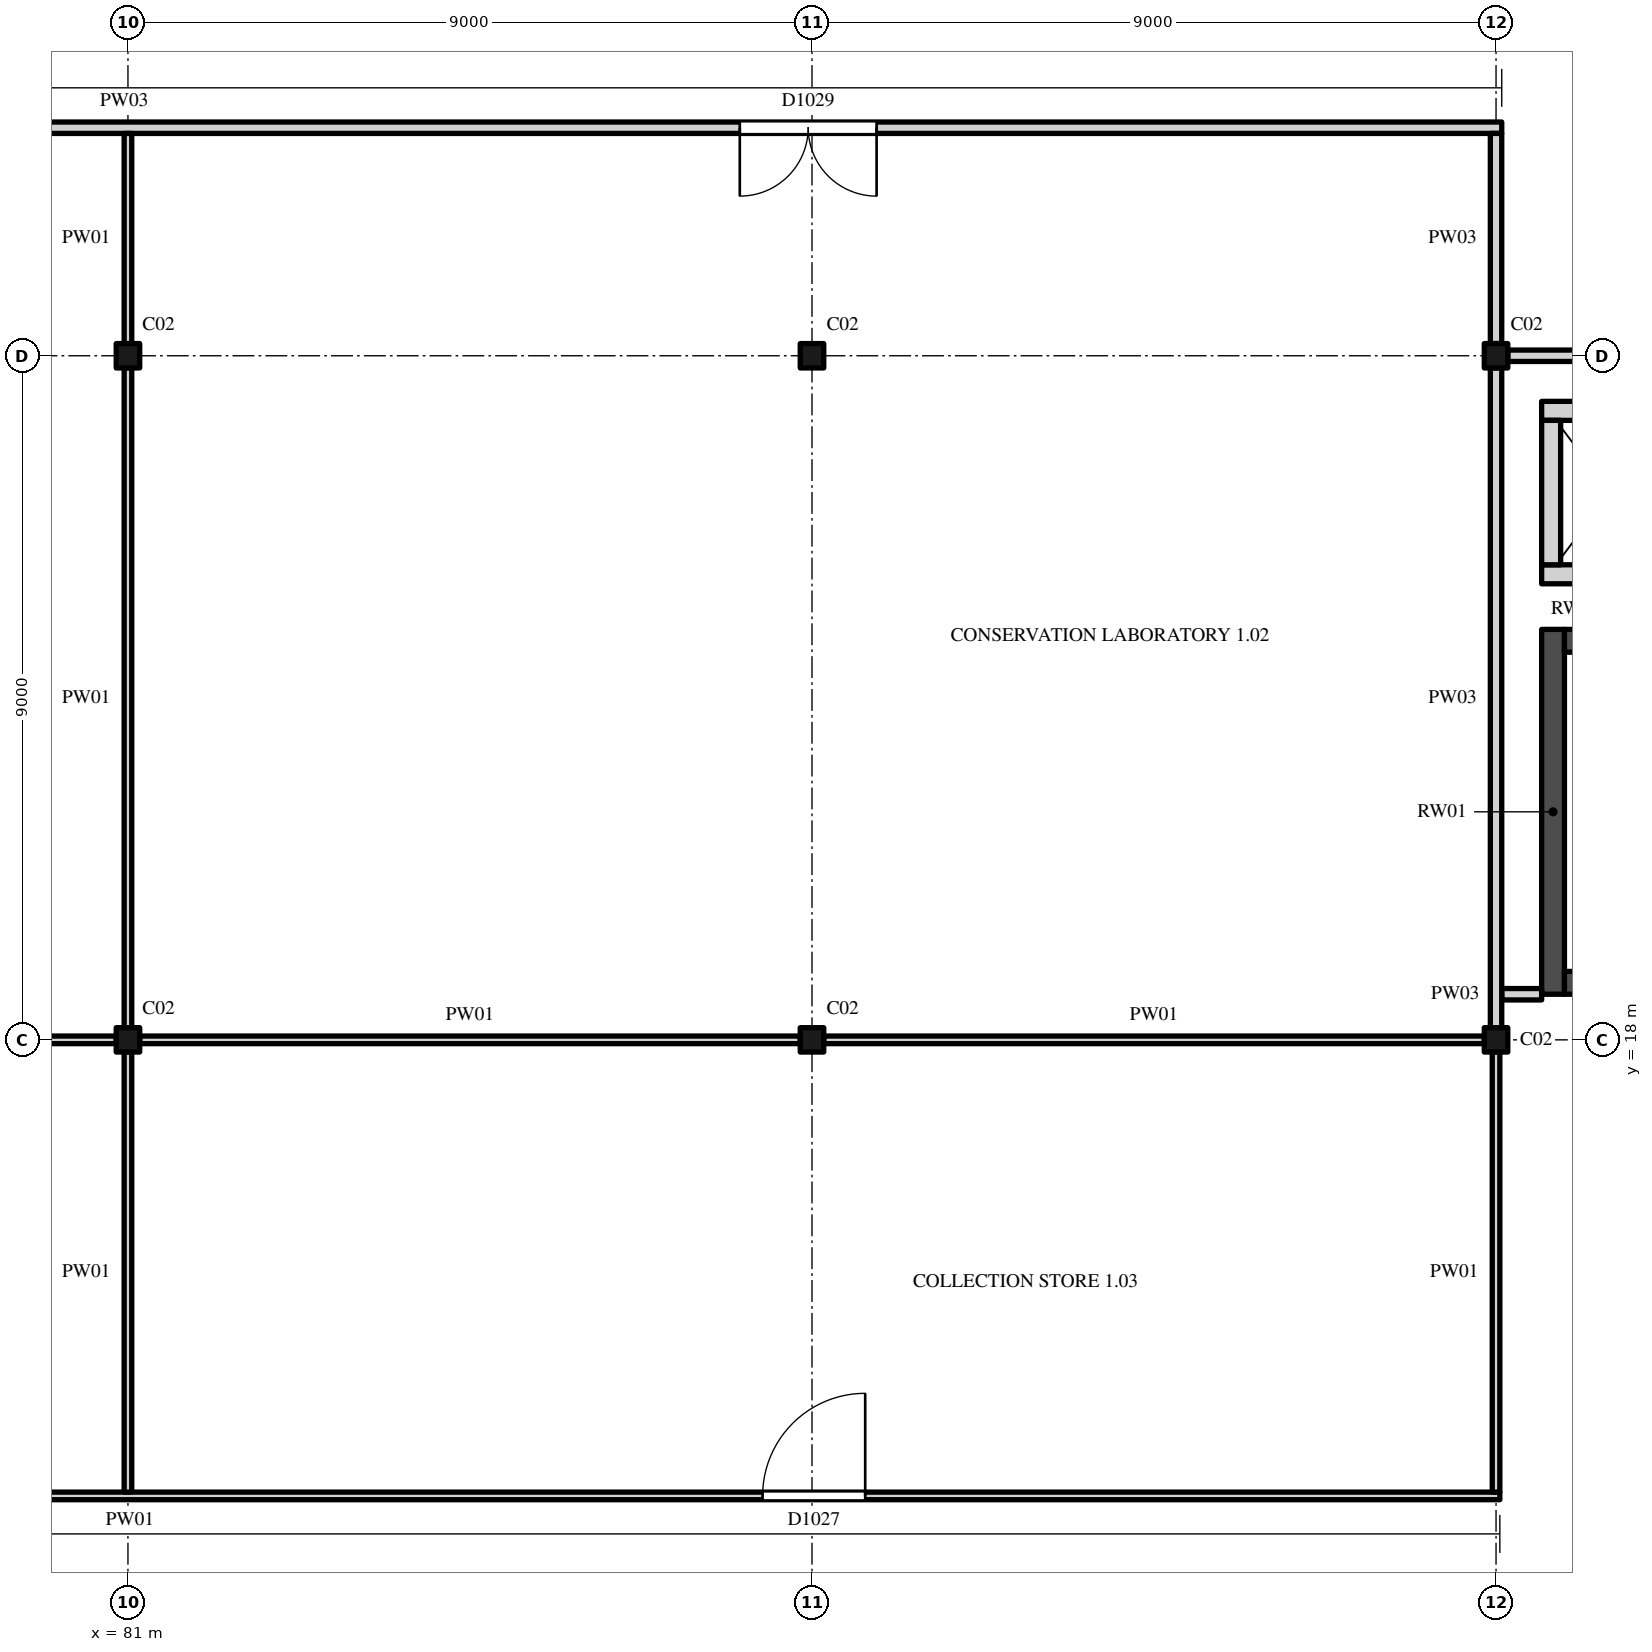
"""IFC4 building model, lengths in metres.
Left out: names, types, materials, properties, quantities, classifications, styles, units other than length and angle.
Written with IfcOpenShell. Run it as: python <this file> out.ifc"""

import sys

from ifc_helpers import new_model, si_unit, direction, frame, frame_2d, origin, origin_2d, place, context, subcontext, project, spatial, rectangle, i_section, extrude, element, fill, save


model = new_model("IFC4")
c1 = context("Model", 3, precision=1e-05, world=origin(), true_north=direction((0.0, 1.0)))
c2 = subcontext(c1, "Body", "Model", "MODEL_VIEW")
j1 = project(units=[si_unit("LENGTHUNIT", "METRE"), si_unit("PLANEANGLEUNIT", "RADIAN")], contexts=[c1])
p1 = place(None, origin())
s1 = spatial("IfcSite", under=j1, at=p1, CompositionType="ELEMENT")
p2 = place(p1, origin())
s2 = spatial("IfcBuilding", under=s1, at=p2, CompositionType="ELEMENT")
p3 = place(p2, frame((0.0, 0.0, 6.0)))
s3 = spatial("IfcBuildingStorey", under=s2, at=p3, CompositionType="ELEMENT", Elevation=6.0)
for number, where, z_axis, x_axis in (
    (1, (81.0, 18.0, 0.0), (0.0, 0.0, 1.0), (1.0, 0.0, 0.0)),
    (2, (90.0, 18.0, 0.0), (0.0, 0.0, 1.0), (1.0, 0.0, 0.0)),
    (3, (99.0, 18.0, 0.0), (0.0, 0.0, 1.0), (1.0, 0.0, 0.0)),
    (4, (81.0, 27.0, 0.0), (0.0, 0.0, 1.0), (1.0, 0.0, 0.0)),
    (5, (90.0, 27.0, 0.0), (0.0, 0.0, 1.0), (1.0, 0.0, 0.0)),
    (6, (99.0, 27.0, 0.0), (0.0, 0.0, 1.0), (1.0, 0.0, 0.0)),
):
    element("IfcColumn", number, at=place(p3, frame(where, z_axis=z_axis, x_axis=x_axis)), inside=s3, PredefinedType="COLUMN", context=c2, shape_type="SweptSolid", body=[
        extrude(i_section(OverallWidth=0.309, OverallDepth=0.321, WebThickness=0.014, FlangeThickness=0.022, FilletRadius=0.017, at=origin_2d()), origin(), (0.0, 0.0, 1.0), 5.0),
    ])
p4 = place(p3, frame((99.75, 18.6, 0.0), z_axis=(0.0, 0.0, 1.0), x_axis=(0.0, 1.0, 0.0)))
e7 = element("IfcWall", 7, at=p4, inside=s3, PredefinedType="SHEAR", context=c2, shape_type="SweptSolid", body=[
    extrude(rectangle(XDim=4.8, YDim=0.3, at=frame_2d((2.4, 0.0))), origin(), (0.0, 0.0, 1.0), 5.0),
])
p5 = place(p3, frame((99.9, 18.75, 0.0), z_axis=(0.0, 0.0, 1.0), x_axis=(1.0, 0.0, 0.0)))
e8 = element("IfcWall", 8, at=p5, inside=s3, PredefinedType="SHEAR", context=c2, shape_type="SweptSolid", body=[
    extrude(rectangle(XDim=3.45, YDim=0.3, at=frame_2d((1.725, 0.0))), origin(), (0.0, 0.0, 1.0), 5.0),
])
p6 = place(p5, frame((0.6, 0.0, 0.0)))
e9 = element("IfcOpeningElement", 9, at=p6, cuts=e8, PredefinedType="OPENING", context=c2, shape_type="SweptSolid", body=[
    extrude(rectangle(XDim=2.1, YDim=2.4, at=frame_2d((1.05, 1.2))), frame((0.0, 0.16, 0.0), z_axis=(0.0, -1.0, 0.0), x_axis=(1.0, 0.0, 0.0)), (0.0, 0.0, 1.0), 0.32),
])
p7 = place(p3, frame((99.9, 23.25, 0.0), z_axis=(0.0, 0.0, 1.0), x_axis=(1.0, 0.0, 0.0)))
e10 = element("IfcWall", 10, at=p7, inside=s3, PredefinedType="SHEAR", context=c2, shape_type="SweptSolid", body=[
    extrude(rectangle(XDim=3.45, YDim=0.3, at=frame_2d((1.725, 0.0))), origin(), (0.0, 0.0, 1.0), 5.0),
])
for number, where, z_axis, x_axis in (
    (11, (99.6, 24.125, 0.0), (0.0, 0.0, 1.0), (1.0, 0.0, 0.0)),
    (12, (99.6, 26.275, 0.0), (0.0, 0.0, 1.0), (1.0, 0.0, 0.0)),
):
    element("IfcWall", number, at=place(p3, frame(where, z_axis=z_axis, x_axis=x_axis)), inside=s3, PredefinedType="STANDARD", context=c2, shape_type="SweptSolid", body=[
        extrude(rectangle(XDim=1.8, YDim=0.25, at=frame_2d((0.9, 0.0))), origin(), (0.0, 0.0, 1.0), 5.0),
    ])
p8 = place(p3, frame((99.725, 24.25, 0.0), z_axis=(0.0, 0.0, 1.0), x_axis=(0.0, 1.0, 0.0)))
e13 = element("IfcWall", 13, at=p8, inside=s3, PredefinedType="STANDARD", context=c2, shape_type="SweptSolid", body=[
    extrude(rectangle(XDim=1.9, YDim=0.25, at=frame_2d((0.95, 0.0))), origin(), (0.0, 0.0, 1.0), 5.0),
])
p9 = place(p3, frame((63.1, 12.0, 0.0), z_axis=(0.0, 0.0, 1.0), x_axis=(1.0, 0.0, 0.0)))
e14 = element("IfcWall", 14, at=p9, inside=s3, PredefinedType="PARTITIONING", context=c2, shape_type="SweptSolid", body=[
    extrude(rectangle(XDim=35.95, YDim=0.1, at=frame_2d((17.975, 0.0))), origin(), (0.0, 0.0, 1.0), 4.419),
])
p10 = place(p9, frame((8.25, 0.0, 0.0)))
e15 = element("IfcOpeningElement", 15, at=p10, cuts=e14, PredefinedType="OPENING", context=c2, shape_type="SweptSolid", body=[
    extrude(rectangle(XDim=1.35, YDim=2.4, at=frame_2d((0.675, 1.2))), frame((0.0, 0.06, 0.0), z_axis=(0.0, -1.0, 0.0), x_axis=(1.0, 0.0, 0.0)), (0.0, 0.0, 1.0), 0.12),
])
p11 = place(p9, frame((26.25, 0.0, 0.0)))
e16 = element("IfcOpeningElement", 16, at=p11, cuts=e14, PredefinedType="OPENING", context=c2, shape_type="SweptSolid", body=[
    extrude(rectangle(XDim=1.35, YDim=2.4, at=frame_2d((0.675, 1.2))), frame((0.0, 0.06, 0.0), z_axis=(0.0, -1.0, 0.0), x_axis=(1.0, 0.0, 0.0)), (0.0, 0.0, 1.0), 0.12),
])
for number, where, z_axis, x_axis in (
    (17, (72.155, 18.0, 0.0), (0.0, 0.0, 1.0), (1.0, 0.0, 0.0)),
    (18, (81.155, 18.0, 0.0), (0.0, 0.0, 1.0), (1.0, 0.0, 0.0)),
    (19, (90.155, 18.0, 0.0), (0.0, 0.0, 1.0), (1.0, 0.0, 0.0)),
):
    element("IfcWall", number, at=place(p3, frame(where, z_axis=z_axis, x_axis=x_axis)), inside=s3, PredefinedType="PARTITIONING", context=c2, shape_type="SweptSolid", body=[
        extrude(rectangle(XDim=8.691, YDim=0.1, at=frame_2d((4.345, 0.0))), origin(), (0.0, 0.0, 1.0), 4.419),
    ])
p12 = place(p3, frame((99.075, 18.6, 0.0), z_axis=(0.0, 0.0, 1.0), x_axis=(1.0, 0.0, 0.0)))
e20 = element("IfcWall", 20, at=p12, inside=s3, PredefinedType="PARTITIONING", context=c2, shape_type="SweptSolid", body=[
    extrude(rectangle(XDim=0.525, YDim=0.15, at=frame_2d((0.263, 0.0))), origin(), (0.0, 0.0, 1.0), 4.825),
])
p13 = place(p3, frame((99.155, 27.0, 0.0), z_axis=(0.0, 0.0, 1.0), x_axis=(1.0, 0.0, 0.0)))
e21 = element("IfcWall", 21, at=p13, inside=s3, PredefinedType="PARTITIONING", context=c2, shape_type="SweptSolid", body=[
    extrude(rectangle(XDim=8.691, YDim=0.15, at=frame_2d((4.345, 0.0))), origin(), (0.0, 0.0, 1.0), 4.419),
])
p14 = place(p13, frame((3.75, 0.0, 0.0)))
e22 = element("IfcOpeningElement", 22, at=p14, cuts=e21, PredefinedType="OPENING", context=c2, shape_type="SweptSolid", body=[
    extrude(rectangle(XDim=1.2, YDim=2.4, at=frame_2d((0.6, 1.2))), frame((0.0, 0.085, 0.0), z_axis=(0.0, -1.0, 0.0), x_axis=(1.0, 0.0, 0.0)), (0.0, 0.0, 1.0), 0.17),
])
p15 = place(p3, frame((62.4, 30.0, 0.0), z_axis=(0.0, 0.0, 1.0), x_axis=(1.0, 0.0, 0.0)))
e23 = element("IfcWall", 23, at=p15, inside=s3, PredefinedType="PARTITIONING", context=c2, shape_type="SweptSolid", body=[
    extrude(rectangle(XDim=36.675, YDim=0.15, at=frame_2d((18.337, 0.0))), origin(), (0.0, 0.0, 1.0), 4.419),
])
p16 = place(p15, frame((8.65, 0.0, 0.0)))
e24 = element("IfcOpeningElement", 24, at=p16, cuts=e23, PredefinedType="OPENING", context=c2, shape_type="SweptSolid", body=[
    extrude(rectangle(XDim=1.8, YDim=2.1, at=frame_2d((0.9, 1.05))), frame((0.0, 0.085, 0.0), z_axis=(0.0, -1.0, 0.0), x_axis=(1.0, 0.0, 0.0)), (0.0, 0.0, 1.0), 0.17),
])
p17 = place(p15, frame((26.65, 0.0, 0.0)))
e25 = element("IfcOpeningElement", 25, at=p17, cuts=e23, PredefinedType="OPENING", context=c2, shape_type="SweptSolid", body=[
    extrude(rectangle(XDim=1.8, YDim=2.1, at=frame_2d((0.9, 1.05))), frame((0.0, 0.085, 0.0), z_axis=(0.0, -1.0, 0.0), x_axis=(1.0, 0.0, 0.0)), (0.0, 0.0, 1.0), 0.17),
])
p18 = place(p3, frame((81.0, 12.05, 0.0), z_axis=(0.0, 0.0, 1.0), x_axis=(0.0, 1.0, 0.0)))
e26 = element("IfcWall", 26, at=p18, inside=s3, PredefinedType="PARTITIONING", context=c2, shape_type="SweptSolid", body=[
    extrude(rectangle(XDim=5.79, YDim=0.1, at=frame_2d((2.895, 0.0))), origin(), (0.0, 0.0, 1.0), 4.297),
])
p19 = place(p3, frame((81.0, 18.16, 0.0), z_axis=(0.0, 0.0, 1.0), x_axis=(0.0, 1.0, 0.0)))
e27 = element("IfcWall", 27, at=p19, inside=s3, PredefinedType="PARTITIONING", context=c2, shape_type="SweptSolid", body=[
    extrude(rectangle(XDim=8.679, YDim=0.1, at=frame_2d((4.34, 0.0))), origin(), (0.0, 0.0, 1.0), 4.297),
])
p20 = place(p3, frame((81.0, 27.16, 0.0), z_axis=(0.0, 0.0, 1.0), x_axis=(0.0, 1.0, 0.0)))
e28 = element("IfcWall", 28, at=p20, inside=s3, PredefinedType="PARTITIONING", context=c2, shape_type="SweptSolid", body=[
    extrude(rectangle(XDim=2.765, YDim=0.1, at=frame_2d((1.382, 0.0))), origin(), (0.0, 0.0, 1.0), 4.297),
])
p21 = place(p3, frame((99.0, 12.05, 0.0), z_axis=(0.0, 0.0, 1.0), x_axis=(0.0, 1.0, 0.0)))
e29 = element("IfcWall", 29, at=p21, inside=s3, PredefinedType="PARTITIONING", context=c2, shape_type="SweptSolid", body=[
    extrude(rectangle(XDim=5.79, YDim=0.1, at=frame_2d((2.895, 0.0))), origin(), (0.0, 0.0, 1.0), 4.297),
])
p22 = place(p3, frame((99.0, 18.16, 0.0), z_axis=(0.0, 0.0, 1.0), x_axis=(0.0, 1.0, 0.0)))
e30 = element("IfcWall", 30, at=p22, inside=s3, PredefinedType="PARTITIONING", context=c2, shape_type="SweptSolid", body=[
    extrude(rectangle(XDim=8.679, YDim=0.15, at=frame_2d((4.34, 0.0))), origin(), (0.0, 0.0, 1.0), 4.297),
])
p23 = place(p3, frame((99.0, 27.16, 0.0), z_axis=(0.0, 0.0, 1.0), x_axis=(0.0, 1.0, 0.0)))
e31 = element("IfcWall", 31, at=p23, inside=s3, PredefinedType="PARTITIONING", context=c2, shape_type="SweptSolid", body=[
    extrude(rectangle(XDim=2.765, YDim=0.15, at=frame_2d((1.382, 0.0))), origin(), (0.0, 0.0, 1.0), 4.297),
])
p24 = place(p11, origin())
e32 = element("IfcDoor", 32, at=p24, inside=s3, OperationType="SINGLE_SWING_LEFT", PredefinedType="DOOR", context=c2, shape_type="SweptSolid", body=[
    extrude(rectangle(XDim=1.35, YDim=2.4, at=frame_2d((0.675, 1.2))), frame((0.0, 0.025, 0.0), z_axis=(0.0, -1.0, 0.0), x_axis=(1.0, 0.0, 0.0)), (0.0, 0.0, 1.0), 0.05),
])
fill(e16, e32)
p25 = place(p17, origin())
e33 = element("IfcDoor", 33, at=p25, inside=s3, OperationType="DOUBLE_DOOR_SINGLE_SWING", PredefinedType="DOOR", context=c2, shape_type="SweptSolid", body=[
    extrude(rectangle(XDim=1.8, YDim=2.1, at=frame_2d((0.9, 1.05))), frame((0.0, 0.025, 0.0), z_axis=(0.0, -1.0, 0.0), x_axis=(1.0, 0.0, 0.0)), (0.0, 0.0, 1.0), 0.05),
])
fill(e25, e33)
save(model, sys.argv[1])
